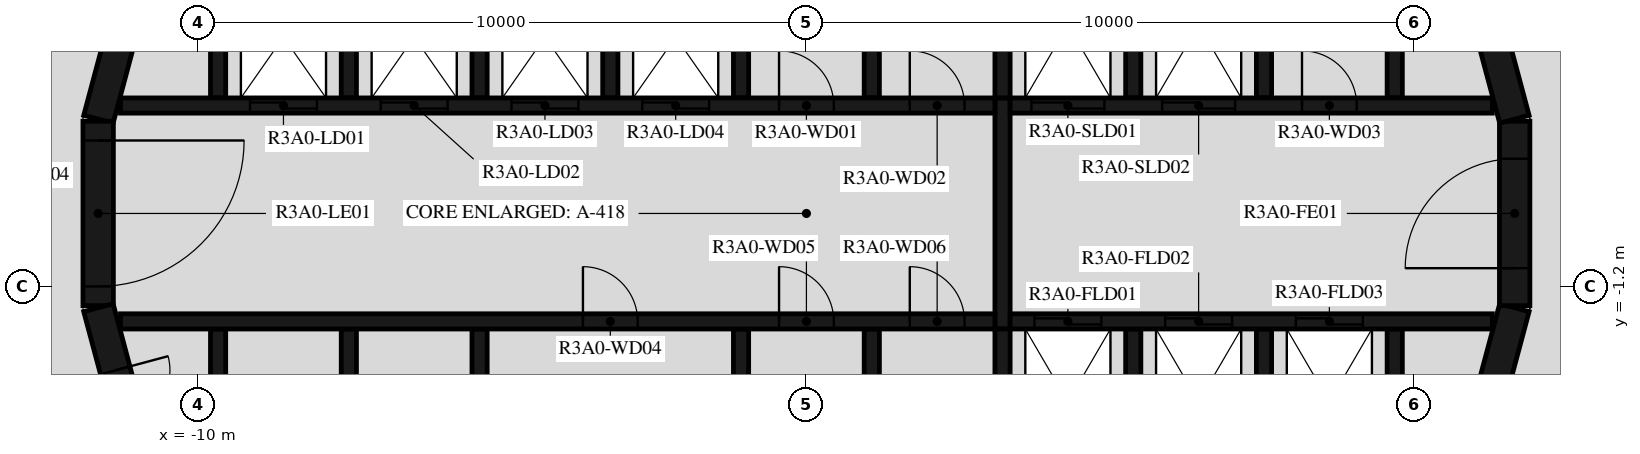
"""IFC4 building model, lengths in metres.
Left out: names, types, materials, properties, quantities, classifications, styles, units other than length and angle.
Written with IfcOpenShell. Run it as: python <this file> out.ifc"""

import sys

from ifc_helpers import new_model, si_unit, direction, frame, frame_2d, origin, place, context, subcontext, project, spatial, polyline, rectangle, outline, extrude, element, fill, save


model = new_model("IFC4")
c1 = context("Model", 3, precision=1e-05, world=origin(), true_north=direction((0.0, 1.0)))
c2 = subcontext(c1, "Body", "Model", "MODEL_VIEW")
j1 = project(units=[si_unit("LENGTHUNIT", "METRE"), si_unit("PLANEANGLEUNIT", "RADIAN")], contexts=[c1])
p1 = place(None, origin())
s1 = spatial("IfcSite", under=j1, at=p1, CompositionType="ELEMENT")
p2 = place(p1, origin())
s2 = spatial("IfcBuilding", under=s1, at=p2, CompositionType="ELEMENT")
p3 = place(p2, frame((0.0, 0.0, 113.4)))
s3 = spatial("IfcBuildingStorey", under=s2, at=p3, CompositionType="ELEMENT", Elevation=113.4)
p4 = place(p3, frame((5.146, 28.027, 0.03), z_axis=(0.0, 0.0, 1.0), x_axis=(0.595048436217, -0.803689839774, 0.0)))
e1 = element("IfcWall", 1, at=p4, inside=s3, PredefinedType="PARAPET", context=c2, shape_type="SweptSolid", body=[
    extrude(rectangle(XDim=35.306, YDim=0.2, at=frame_2d((17.653, 0.0))), origin(), (0.0, 0.0, 1.0), 1.5),
])
p5 = place(p3, frame((10.858, -4.479, 0.0), z_axis=(0.0, 0.0, 1.0), x_axis=(0.258734743916, 0.965948410781, 0.0)))
e2 = element("IfcWall", 2, at=p5, inside=s3, PredefinedType="SHEAR", context=c2, shape_type="SweptSolid", body=[
    extrude(rectangle(XDim=3.033, YDim=0.5, at=frame_2d((1.516, 0.0))), origin(), (0.0, 0.0, 1.0), 3.12),
])
p6 = place(p3, frame((11.647, -1.516, 0.0), z_axis=(0.0, 0.0, 1.0), x_axis=(0.0, 1.0, 0.0)))
e3 = element("IfcWall", 3, at=p6, inside=s3, PredefinedType="SHEAR", context=c2, shape_type="SweptSolid", body=[
    extrude(rectangle(XDim=3.033, YDim=0.5, at=frame_2d((1.516, 0.0))), origin(), (0.0, 0.0, 1.0), 3.12),
])
p7 = place(p6, frame((0.616, 0.0, 0.0)))
e4 = element("IfcOpeningElement", 4, at=p7, cuts=e3, PredefinedType="OPENING", context=c2, shape_type="SweptSolid", body=[
    extrude(rectangle(XDim=1.8, YDim=2.1, at=frame_2d((0.9, 1.05))), frame((0.0, 0.26, 0.0), z_axis=(0.0, -1.0, 0.0), x_axis=(1.0, 0.0, 0.0)), (0.0, 0.0, 1.0), 0.52),
])
for number, where, z_axis, x_axis in (
    (5, (11.643, 1.55, 0.0), (0.0, 0.0, 1.0), (-0.259, 0.966, 0.0)),
    (6, (-10.858, 4.479, 0.0), (0.0, 0.0, 1.0), (-0.259, -0.966, 0.0)),
):
    element("IfcWall", number, at=place(p3, frame(where, z_axis=z_axis, x_axis=x_axis)), inside=s3, PredefinedType="SHEAR", context=c2, shape_type="SweptSolid", body=[
        extrude(rectangle(XDim=3.033, YDim=0.5, at=frame_2d((1.516, 0.0))), origin(), (0.0, 0.0, 1.0), 3.12),
    ])
p8 = place(p3, frame((-11.647, 1.516, 0.0), z_axis=(0.0, 0.0, 1.0), x_axis=(0.0, -1.0, 0.0)))
e7 = element("IfcWall", 7, at=p8, inside=s3, PredefinedType="SHEAR", context=c2, shape_type="SweptSolid", body=[
    extrude(rectangle(XDim=3.033, YDim=0.5, at=frame_2d((1.516, 0.0))), origin(), (0.0, 0.0, 1.0), 3.12),
])
p9 = place(p8, frame((0.316, 0.0, 0.0)))
e8 = element("IfcOpeningElement", 8, at=p9, cuts=e7, PredefinedType="OPENING", context=c2, shape_type="SweptSolid", body=[
    extrude(rectangle(XDim=2.4, YDim=2.1, at=frame_2d((1.2, 1.05))), frame((0.0, 0.26, 0.0), z_axis=(0.0, -1.0, 0.0), x_axis=(1.0, 0.0, 0.0)), (0.0, 0.0, 1.0), 0.52),
])
p10 = place(p3, frame((-11.643, -1.55, 0.0), z_axis=(0.0, 0.0, 1.0), x_axis=(0.258734743916, -0.965948410781, 0.0)))
e9 = element("IfcWall", 9, at=p10, inside=s3, PredefinedType="SHEAR", context=c2, shape_type="SweptSolid", body=[
    extrude(rectangle(XDim=3.033, YDim=0.5, at=frame_2d((1.516, 0.0))), origin(), (0.0, 0.0, 1.0), 3.12),
])
p11 = place(p10, frame((1.066, 0.0, 0.0)))
e10 = element("IfcOpeningElement", 10, at=p11, cuts=e9, PredefinedType="OPENING", context=c2, shape_type="SweptSolid", body=[
    extrude(rectangle(XDim=0.9, YDim=2.1, at=frame_2d((0.45, 1.05))), frame((0.0, 0.26, 0.0), z_axis=(0.0, -1.0, 0.0), x_axis=(1.0, 0.0, 0.0)), (0.0, 0.0, 1.0), 0.52),
])
p12 = place(p3, origin())
e11 = element("IfcWall", 11, at=p12, inside=s3, PredefinedType="SHEAR", context=c2, shape_type="SweptSolid", body=[
    extrude(outline(polyline([(-9.55, 4.8), (-7.65, 4.8), (-7.65, 1.9), (-7.4, 1.9), (-7.4, 4.8), (-5.5, 4.8), (-5.5, 1.9), (-5.25, 1.9), (-5.25, 4.8), (-3.35, 4.8), (-3.35, 1.9), (-3.1, 1.9), (-3.1, 4.8), (-1.2, 4.8), (-1.2, 1.9), (-0.95, 1.9), (-0.95, 4.8), (0.95, 4.8), (0.95, 1.9), (1.2, 1.9), (1.2, 4.8), (3.1, 4.8), (3.1, 1.9), (3.35, 1.9), (3.35, 4.8), (5.25, 4.8), (5.25, 1.9), (5.5, 1.9), (5.5, 4.8), (7.4, 4.8), (7.4, 1.9), (7.65, 1.9), (7.65, 4.8), (9.55, 4.8), (9.55, 1.9), (9.8, 1.9), (9.8, 4.8), (9.8, 5.05), (-9.8, 5.05), (-9.8, 4.8), (-9.8, 1.9), (-9.55, 1.9), (-9.55, 4.8)])), origin(), (0.0, 0.0, 1.0), 3.12),
])
p13 = place(p3, origin())
e12 = element("IfcWall", 12, at=p13, inside=s3, PredefinedType="SHEAR", context=c2, shape_type="SweptSolid", body=[
    extrude(outline(polyline([(9.8, -5.05), (9.8, -4.8), (9.8, -1.9), (9.55, -1.9), (9.55, -4.8), (7.65, -4.8), (7.65, -1.9), (7.4, -1.9), (7.4, -4.8), (5.5, -4.8), (5.5, -1.9), (5.25, -1.9), (5.25, -4.8), (3.35, -4.8), (3.35, -1.9), (3.1, -1.9), (3.1, -4.8), (1.2, -4.8), (1.2, -1.9), (0.95, -1.9), (0.95, -4.8), (-0.95, -4.8), (-0.95, -1.9), (-1.2, -1.9), (-1.2, -4.8), (-5.25, -4.8), (-5.25, -1.9), (-5.5, -1.9), (-5.5, -4.8), (-7.4, -4.8), (-7.4, -1.9), (-7.65, -1.9), (-7.65, -4.8), (-9.55, -4.8), (-9.55, -1.9), (-9.8, -1.9), (-9.8, -4.8), (-9.8, -5.05), (9.8, -5.05)])), origin(), (0.0, 0.0, 1.0), 3.12),
])
p14 = place(p3, frame((-11.28, 1.775, 0.0), z_axis=(0.0, 0.0, 1.0), x_axis=(1.0, 0.0, 0.0)))
e13 = element("IfcWall", 13, at=p14, inside=s3, PredefinedType="SHEAR", context=c2, shape_type="SweptSolid", body=[
    extrude(rectangle(XDim=14.38, YDim=0.25, at=frame_2d((7.19, 0.0))), origin(), (0.0, 0.0, 1.0), 3.12),
])
p15 = place(p14, frame((2.13, 0.0, 0.0)))
e14 = element("IfcOpeningElement", 14, at=p15, cuts=e13, PredefinedType="OPENING", context=c2, shape_type="SweptSolid", body=[
    extrude(rectangle(XDim=1.1, YDim=2.1, at=frame_2d((0.55, 1.05))), frame((0.0, 0.135, 0.0), z_axis=(0.0, -1.0, 0.0), x_axis=(1.0, 0.0, 0.0)), (0.0, 0.0, 1.0), 0.27),
])
p16 = place(p14, frame((4.28, 0.0, 0.0)))
e15 = element("IfcOpeningElement", 15, at=p16, cuts=e13, PredefinedType="OPENING", context=c2, shape_type="SweptSolid", body=[
    extrude(rectangle(XDim=1.1, YDim=2.1, at=frame_2d((0.55, 1.05))), frame((0.0, 0.135, 0.0), z_axis=(0.0, -1.0, 0.0), x_axis=(1.0, 0.0, 0.0)), (0.0, 0.0, 1.0), 0.27),
])
p17 = place(p14, frame((6.43, 0.0, 0.0)))
e16 = element("IfcOpeningElement", 16, at=p17, cuts=e13, PredefinedType="OPENING", context=c2, shape_type="SweptSolid", body=[
    extrude(rectangle(XDim=1.1, YDim=2.1, at=frame_2d((0.55, 1.05))), frame((0.0, 0.135, 0.0), z_axis=(0.0, -1.0, 0.0), x_axis=(1.0, 0.0, 0.0)), (0.0, 0.0, 1.0), 0.27),
])
p18 = place(p14, frame((8.58, 0.0, 0.0)))
e17 = element("IfcOpeningElement", 17, at=p18, cuts=e13, PredefinedType="OPENING", context=c2, shape_type="SweptSolid", body=[
    extrude(rectangle(XDim=1.1, YDim=2.1, at=frame_2d((0.55, 1.05))), frame((0.0, 0.135, 0.0), z_axis=(0.0, -1.0, 0.0), x_axis=(1.0, 0.0, 0.0)), (0.0, 0.0, 1.0), 0.27),
])
p19 = place(p14, frame((10.83, 0.0, 0.0)))
e18 = element("IfcOpeningElement", 18, at=p19, cuts=e13, PredefinedType="OPENING", context=c2, shape_type="SweptSolid", body=[
    extrude(rectangle(XDim=0.9, YDim=2.1, at=frame_2d((0.45, 1.05))), frame((0.0, 0.135, 0.0), z_axis=(0.0, -1.0, 0.0), x_axis=(1.0, 0.0, 0.0)), (0.0, 0.0, 1.0), 0.27),
])
p20 = place(p14, frame((12.98, 0.0, 0.0)))
e19 = element("IfcOpeningElement", 19, at=p20, cuts=e13, PredefinedType="OPENING", context=c2, shape_type="SweptSolid", body=[
    extrude(rectangle(XDim=0.9, YDim=2.1, at=frame_2d((0.45, 1.05))), frame((0.0, 0.135, 0.0), z_axis=(0.0, -1.0, 0.0), x_axis=(1.0, 0.0, 0.0)), (0.0, 0.0, 1.0), 0.27),
])
p21 = place(p3, frame((3.35, 1.775, 0.0), z_axis=(0.0, 0.0, 1.0), x_axis=(1.0, 0.0, 0.0)))
e20 = element("IfcWall", 20, at=p21, inside=s3, PredefinedType="SHEAR", context=c2, shape_type="SweptSolid", body=[
    extrude(rectangle(XDim=7.93, YDim=0.25, at=frame_2d((3.965, 0.0))), origin(), (0.0, 0.0, 1.0), 3.12),
])
p22 = place(p21, frame((0.35, 0.0, 0.0)))
e21 = element("IfcOpeningElement", 21, at=p22, cuts=e20, PredefinedType="OPENING", context=c2, shape_type="SweptSolid", body=[
    extrude(rectangle(XDim=1.2, YDim=2.4, at=frame_2d((0.6, 1.2))), frame((0.0, 0.135, 0.0), z_axis=(0.0, -1.0, 0.0), x_axis=(1.0, 0.0, 0.0)), (0.0, 0.0, 1.0), 0.27),
])
p23 = place(p21, frame((2.5, 0.0, 0.0)))
e22 = element("IfcOpeningElement", 22, at=p23, cuts=e20, PredefinedType="OPENING", context=c2, shape_type="SweptSolid", body=[
    extrude(rectangle(XDim=1.2, YDim=2.4, at=frame_2d((0.6, 1.2))), frame((0.0, 0.135, 0.0), z_axis=(0.0, -1.0, 0.0), x_axis=(1.0, 0.0, 0.0)), (0.0, 0.0, 1.0), 0.27),
])
p24 = place(p21, frame((4.8, 0.0, 0.0)))
e23 = element("IfcOpeningElement", 23, at=p24, cuts=e20, PredefinedType="OPENING", context=c2, shape_type="SweptSolid", body=[
    extrude(rectangle(XDim=0.9, YDim=2.1, at=frame_2d((0.45, 1.05))), frame((0.0, 0.135, 0.0), z_axis=(0.0, -1.0, 0.0), x_axis=(1.0, 0.0, 0.0)), (0.0, 0.0, 1.0), 0.27),
])
p25 = place(p3, frame((-11.28, -1.775, 0.0), z_axis=(0.0, 0.0, 1.0), x_axis=(1.0, 0.0, 0.0)))
e24 = element("IfcWall", 24, at=p25, inside=s3, PredefinedType="SHEAR", context=c2, shape_type="SweptSolid", body=[
    extrude(rectangle(XDim=14.38, YDim=0.25, at=frame_2d((7.19, 0.0))), origin(), (0.0, 0.0, 1.0), 3.12),
])
p26 = place(p25, frame((7.605, 0.0, 0.0)))
e25 = element("IfcOpeningElement", 25, at=p26, cuts=e24, PredefinedType="OPENING", context=c2, shape_type="SweptSolid", body=[
    extrude(rectangle(XDim=0.9, YDim=2.1, at=frame_2d((0.45, 1.05))), frame((0.0, 0.135, 0.0), z_axis=(0.0, -1.0, 0.0), x_axis=(1.0, 0.0, 0.0)), (0.0, 0.0, 1.0), 0.27),
])
p27 = place(p25, frame((10.83, 0.0, 0.0)))
e26 = element("IfcOpeningElement", 26, at=p27, cuts=e24, PredefinedType="OPENING", context=c2, shape_type="SweptSolid", body=[
    extrude(rectangle(XDim=0.9, YDim=2.1, at=frame_2d((0.45, 1.05))), frame((0.0, 0.135, 0.0), z_axis=(0.0, -1.0, 0.0), x_axis=(1.0, 0.0, 0.0)), (0.0, 0.0, 1.0), 0.27),
])
p28 = place(p25, frame((12.98, 0.0, 0.0)))
e27 = element("IfcOpeningElement", 27, at=p28, cuts=e24, PredefinedType="OPENING", context=c2, shape_type="SweptSolid", body=[
    extrude(rectangle(XDim=0.9, YDim=2.1, at=frame_2d((0.45, 1.05))), frame((0.0, 0.135, 0.0), z_axis=(0.0, -1.0, 0.0), x_axis=(1.0, 0.0, 0.0)), (0.0, 0.0, 1.0), 0.27),
])
p29 = place(p3, frame((3.35, -1.775, 0.0), z_axis=(0.0, 0.0, 1.0), x_axis=(1.0, 0.0, 0.0)))
e28 = element("IfcWall", 28, at=p29, inside=s3, PredefinedType="SHEAR", context=c2, shape_type="SweptSolid", body=[
    extrude(rectangle(XDim=7.93, YDim=0.25, at=frame_2d((3.965, 0.0))), origin(), (0.0, 0.0, 1.0), 3.12),
])
p30 = place(p29, frame((0.4, 0.0, 0.0)))
e29 = element("IfcOpeningElement", 29, at=p30, cuts=e28, PredefinedType="OPENING", context=c2, shape_type="SweptSolid", body=[
    extrude(rectangle(XDim=1.1, YDim=2.4, at=frame_2d((0.55, 1.2))), frame((0.0, 0.135, 0.0), z_axis=(0.0, -1.0, 0.0), x_axis=(1.0, 0.0, 0.0)), (0.0, 0.0, 1.0), 0.27),
])
p31 = place(p29, frame((2.55, 0.0, 0.0)))
e30 = element("IfcOpeningElement", 30, at=p31, cuts=e28, PredefinedType="OPENING", context=c2, shape_type="SweptSolid", body=[
    extrude(rectangle(XDim=1.1, YDim=2.4, at=frame_2d((0.55, 1.2))), frame((0.0, 0.135, 0.0), z_axis=(0.0, -1.0, 0.0), x_axis=(1.0, 0.0, 0.0)), (0.0, 0.0, 1.0), 0.27),
])
p32 = place(p29, frame((4.7, 0.0, 0.0)))
e31 = element("IfcOpeningElement", 31, at=p32, cuts=e28, PredefinedType="OPENING", context=c2, shape_type="SweptSolid", body=[
    extrude(rectangle(XDim=1.1, YDim=2.4, at=frame_2d((0.55, 1.2))), frame((0.0, 0.135, 0.0), z_axis=(0.0, -1.0, 0.0), x_axis=(1.0, 0.0, 0.0)), (0.0, 0.0, 1.0), 0.27),
])
p33 = place(p3, frame((3.225, -1.9, 0.0), z_axis=(0.0, 0.0, 1.0), x_axis=(0.0, 1.0, 0.0)))
e32 = element("IfcWall", 32, at=p33, inside=s3, PredefinedType="SHEAR", context=c2, shape_type="SweptSolid", body=[
    extrude(rectangle(XDim=3.8, YDim=0.25, at=frame_2d((1.9, 0.0))), origin(), (0.0, 0.0, 1.0), 3.12),
])
p34 = place(p3, frame((12.028, -7.516, 0.0), z_axis=(0.0, 0.0, 1.0), x_axis=(0.292365533182, 0.956306642771, 0.0)))
e33 = element("IfcWall", 33, at=p34, inside=s3, PredefinedType="STANDARD", context=c2, shape_type="SweptSolid", body=[
    extrude(rectangle(XDim=7.342, YDim=0.2, at=frame_2d((3.671, 0.0))), origin(), (0.0, 0.0, 1.0), 3.12),
])
p35 = place(p3, frame((-12.028, 7.516, 0.0), z_axis=(0.0, 0.0, 1.0), x_axis=(-0.292365533182, -0.956306642771, 0.0)))
e34 = element("IfcWall", 34, at=p35, inside=s3, PredefinedType="STANDARD", context=c2, shape_type="SweptSolid", body=[
    extrude(rectangle(XDim=7.342, YDim=0.2, at=frame_2d((3.671, 0.0))), origin(), (0.0, 0.0, 1.0), 3.12),
])
p36 = place(p35, frame((2.533, 0.0, 0.0)))
e35 = element("IfcOpeningElement", 35, at=p36, cuts=e34, PredefinedType="OPENING", context=c2, shape_type="SweptSolid", body=[
    extrude(rectangle(XDim=1.0, YDim=2.1, at=frame_2d((0.5, 1.05))), frame((0.0, 0.11, 0.0), z_axis=(0.0, -1.0, 0.0), x_axis=(1.0, 0.0, 0.0)), (0.0, 0.0, 1.0), 0.22),
])
p37 = place(p9, origin())
e36 = element("IfcDoor", 36, at=p37, inside=s3, OperationType="DOUBLE_DOOR_SINGLE_SWING", PredefinedType="DOOR", context=c2, shape_type="SweptSolid", body=[
    extrude(rectangle(XDim=2.4, YDim=2.1, at=frame_2d((1.2, 1.05))), frame((0.0, 0.025, 0.0), z_axis=(0.0, -1.0, 0.0), x_axis=(1.0, 0.0, 0.0)), (0.0, 0.0, 1.0), 0.05),
])
fill(e8, e36)
p38 = place(p7, origin())
e37 = element("IfcDoor", 37, at=p38, inside=s3, OperationType="DOUBLE_DOOR_SINGLE_SWING", PredefinedType="DOOR", context=c2, shape_type="SweptSolid", body=[
    extrude(rectangle(XDim=1.8, YDim=2.1, at=frame_2d((0.9, 1.05))), frame((0.0, 0.025, 0.0), z_axis=(0.0, -1.0, 0.0), x_axis=(1.0, 0.0, 0.0)), (0.0, 0.0, 1.0), 0.05),
])
fill(e4, e37)
p39 = place(p15, origin())
e38 = element("IfcDoor", 38, at=p39, inside=s3, OperationType="DOUBLE_DOOR_SLIDING", PredefinedType="DOOR", context=c2, shape_type="SweptSolid", body=[
    extrude(rectangle(XDim=1.1, YDim=2.1, at=frame_2d((0.55, 1.05))), frame((0.0, 0.025, 0.0), z_axis=(0.0, -1.0, 0.0), x_axis=(1.0, 0.0, 0.0)), (0.0, 0.0, 1.0), 0.05),
])
fill(e14, e38)
p40 = place(p16, origin())
e39 = element("IfcDoor", 39, at=p40, inside=s3, OperationType="DOUBLE_DOOR_SLIDING", PredefinedType="DOOR", context=c2, shape_type="SweptSolid", body=[
    extrude(rectangle(XDim=1.1, YDim=2.1, at=frame_2d((0.55, 1.05))), frame((0.0, 0.025, 0.0), z_axis=(0.0, -1.0, 0.0), x_axis=(1.0, 0.0, 0.0)), (0.0, 0.0, 1.0), 0.05),
])
fill(e15, e39)
p41 = place(p17, origin())
e40 = element("IfcDoor", 40, at=p41, inside=s3, OperationType="DOUBLE_DOOR_SLIDING", PredefinedType="DOOR", context=c2, shape_type="SweptSolid", body=[
    extrude(rectangle(XDim=1.1, YDim=2.1, at=frame_2d((0.55, 1.05))), frame((0.0, 0.025, 0.0), z_axis=(0.0, -1.0, 0.0), x_axis=(1.0, 0.0, 0.0)), (0.0, 0.0, 1.0), 0.05),
])
fill(e16, e40)
p42 = place(p18, origin())
e41 = element("IfcDoor", 41, at=p42, inside=s3, OperationType="DOUBLE_DOOR_SLIDING", PredefinedType="DOOR", context=c2, shape_type="SweptSolid", body=[
    extrude(rectangle(XDim=1.1, YDim=2.1, at=frame_2d((0.55, 1.05))), frame((0.0, 0.025, 0.0), z_axis=(0.0, -1.0, 0.0), x_axis=(1.0, 0.0, 0.0)), (0.0, 0.0, 1.0), 0.05),
])
fill(e17, e41)
p43 = place(p22, origin())
e42 = element("IfcDoor", 42, at=p43, inside=s3, OperationType="DOUBLE_DOOR_SLIDING", PredefinedType="DOOR", context=c2, shape_type="SweptSolid", body=[
    extrude(rectangle(XDim=1.2, YDim=2.4, at=frame_2d((0.6, 1.2))), frame((0.0, 0.025, 0.0), z_axis=(0.0, -1.0, 0.0), x_axis=(1.0, 0.0, 0.0)), (0.0, 0.0, 1.0), 0.05),
])
fill(e21, e42)
p44 = place(p23, origin())
e43 = element("IfcDoor", 43, at=p44, inside=s3, OperationType="DOUBLE_DOOR_SLIDING", PredefinedType="DOOR", context=c2, shape_type="SweptSolid", body=[
    extrude(rectangle(XDim=1.2, YDim=2.4, at=frame_2d((0.6, 1.2))), frame((0.0, 0.025, 0.0), z_axis=(0.0, -1.0, 0.0), x_axis=(1.0, 0.0, 0.0)), (0.0, 0.0, 1.0), 0.05),
])
fill(e22, e43)
p45 = place(p30, origin())
e44 = element("IfcDoor", 44, at=p45, inside=s3, OperationType="DOUBLE_DOOR_SLIDING", PredefinedType="DOOR", context=c2, shape_type="SweptSolid", body=[
    extrude(rectangle(XDim=1.1, YDim=2.4, at=frame_2d((0.55, 1.2))), frame((0.0, 0.025, 0.0), z_axis=(0.0, -1.0, 0.0), x_axis=(1.0, 0.0, 0.0)), (0.0, 0.0, 1.0), 0.05),
])
fill(e29, e44)
p46 = place(p31, origin())
e45 = element("IfcDoor", 45, at=p46, inside=s3, OperationType="DOUBLE_DOOR_SLIDING", PredefinedType="DOOR", context=c2, shape_type="SweptSolid", body=[
    extrude(rectangle(XDim=1.1, YDim=2.4, at=frame_2d((0.55, 1.2))), frame((0.0, 0.025, 0.0), z_axis=(0.0, -1.0, 0.0), x_axis=(1.0, 0.0, 0.0)), (0.0, 0.0, 1.0), 0.05),
])
fill(e30, e45)
p47 = place(p32, origin())
e46 = element("IfcDoor", 46, at=p47, inside=s3, OperationType="DOUBLE_DOOR_SLIDING", PredefinedType="DOOR", context=c2, shape_type="SweptSolid", body=[
    extrude(rectangle(XDim=1.1, YDim=2.4, at=frame_2d((0.55, 1.2))), frame((0.0, 0.025, 0.0), z_axis=(0.0, -1.0, 0.0), x_axis=(1.0, 0.0, 0.0)), (0.0, 0.0, 1.0), 0.05),
])
fill(e31, e46)
p48 = place(p19, origin())
e47 = element("IfcDoor", 47, at=p48, inside=s3, OperationType="SINGLE_SWING_RIGHT", PredefinedType="DOOR", context=c2, shape_type="SweptSolid", body=[
    extrude(rectangle(XDim=0.9, YDim=2.1, at=frame_2d((0.45, 1.05))), frame((0.0, 0.025, 0.0), z_axis=(0.0, -1.0, 0.0), x_axis=(1.0, 0.0, 0.0)), (0.0, 0.0, 1.0), 0.05),
])
fill(e18, e47)
p49 = place(p20, origin())
e48 = element("IfcDoor", 48, at=p49, inside=s3, OperationType="SINGLE_SWING_LEFT", PredefinedType="DOOR", context=c2, shape_type="SweptSolid", body=[
    extrude(rectangle(XDim=0.9, YDim=2.1, at=frame_2d((0.45, 1.05))), frame((0.0, 0.025, 0.0), z_axis=(0.0, -1.0, 0.0), x_axis=(1.0, 0.0, 0.0)), (0.0, 0.0, 1.0), 0.05),
])
fill(e19, e48)
p50 = place(p24, origin())
e49 = element("IfcDoor", 49, at=p50, inside=s3, OperationType="SINGLE_SWING_RIGHT", PredefinedType="DOOR", context=c2, shape_type="SweptSolid", body=[
    extrude(rectangle(XDim=0.9, YDim=2.1, at=frame_2d((0.45, 1.05))), frame((0.0, 0.025, 0.0), z_axis=(0.0, -1.0, 0.0), x_axis=(1.0, 0.0, 0.0)), (0.0, 0.0, 1.0), 0.05),
])
fill(e23, e49)
p51 = place(p26, origin())
e50 = element("IfcDoor", 50, at=p51, inside=s3, OperationType="SINGLE_SWING_LEFT", PredefinedType="DOOR", context=c2, shape_type="SweptSolid", body=[
    extrude(rectangle(XDim=0.9, YDim=2.1, at=frame_2d((0.45, 1.05))), frame((0.0, 0.025, 0.0), z_axis=(0.0, -1.0, 0.0), x_axis=(1.0, 0.0, 0.0)), (0.0, 0.0, 1.0), 0.05),
])
fill(e25, e50)
p52 = place(p27, origin())
e51 = element("IfcDoor", 51, at=p52, inside=s3, OperationType="SINGLE_SWING_RIGHT", PredefinedType="DOOR", context=c2, shape_type="SweptSolid", body=[
    extrude(rectangle(XDim=0.9, YDim=2.1, at=frame_2d((0.45, 1.05))), frame((0.0, 0.025, 0.0), z_axis=(0.0, -1.0, 0.0), x_axis=(1.0, 0.0, 0.0)), (0.0, 0.0, 1.0), 0.05),
])
fill(e26, e51)
p53 = place(p28, origin())
e52 = element("IfcDoor", 52, at=p53, inside=s3, OperationType="SINGLE_SWING_LEFT", PredefinedType="DOOR", context=c2, shape_type="SweptSolid", body=[
    extrude(rectangle(XDim=0.9, YDim=2.1, at=frame_2d((0.45, 1.05))), frame((0.0, 0.025, 0.0), z_axis=(0.0, -1.0, 0.0), x_axis=(1.0, 0.0, 0.0)), (0.0, 0.0, 1.0), 0.05),
])
fill(e27, e52)
p54 = place(p11, origin())
e53 = element("IfcDoor", 53, at=p54, inside=s3, OperationType="SINGLE_SWING_RIGHT", PredefinedType="DOOR", context=c2, shape_type="SweptSolid", body=[
    extrude(rectangle(XDim=0.9, YDim=2.1, at=frame_2d((0.45, 1.05))), frame((0.0, 0.025, 0.0), z_axis=(0.0, -1.0, 0.0), x_axis=(1.0, 0.0, 0.0)), (0.0, 0.0, 1.0), 0.05),
])
fill(e10, e53)
save(model, sys.argv[1])
